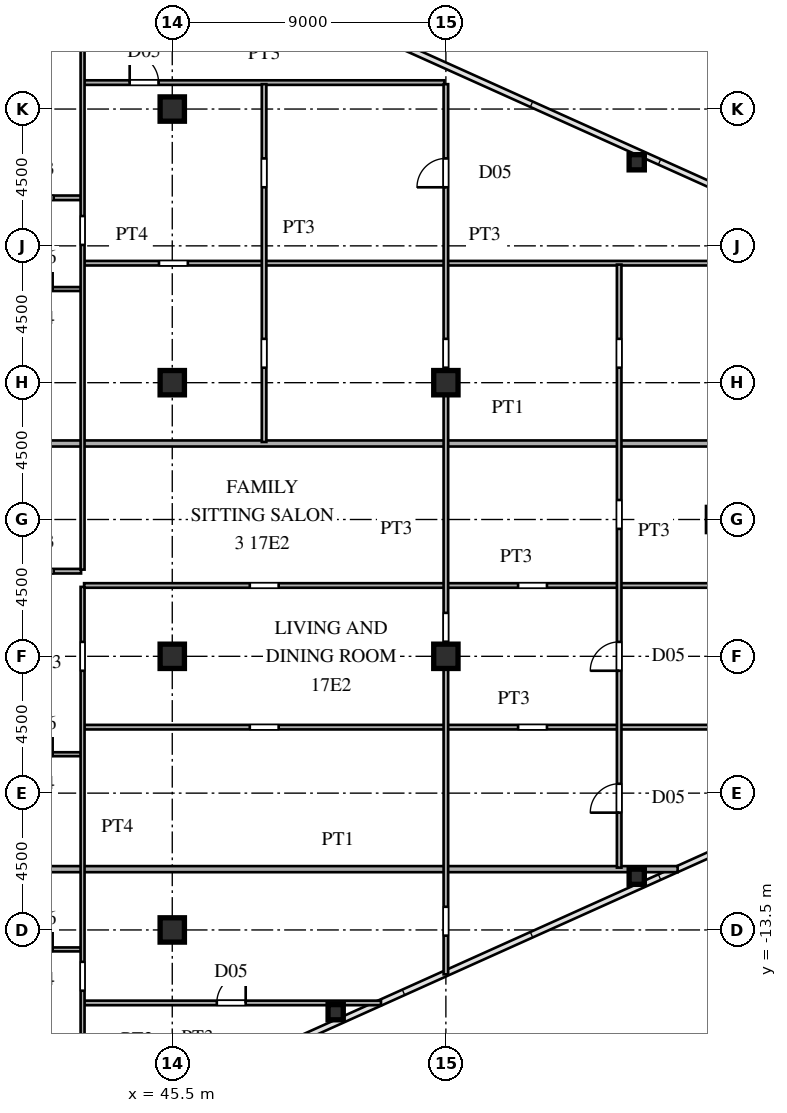
"""IFC4 building model, lengths in metres.
Left out: names, types, materials, properties, quantities, classifications, styles, units other than length and angle.
Written with IfcOpenShell. Run it as: python <this file> out.ifc"""

import sys

from ifc_helpers import new_model, si_unit, direction, frame, frame_2d, origin, origin_2d, place, context, subcontext, project, spatial, rectangle, hollow_rectangle, i_section, extrude, source, transform, mapped, element, fill, save


model = new_model("IFC4")
c1 = context("Model", 3, precision=1e-05, world=origin(), true_north=direction((0.0, 1.0)))
c2 = subcontext(c1, "Body", "Model", "MODEL_VIEW")
j1 = project(units=[si_unit("LENGTHUNIT", "METRE"), si_unit("PLANEANGLEUNIT", "RADIAN")], contexts=[c1])
p1 = place(None, origin())
s1 = spatial("IfcSite", under=j1, at=p1, CompositionType="ELEMENT")
p2 = place(p1, origin())
s2 = spatial("IfcBuilding", under=s1, at=p2, CompositionType="ELEMENT")
p3 = place(p2, frame((0.0, 0.0, 65.7)))
s3 = spatial("IfcBuildingStorey", under=s2, at=p3, CompositionType="ELEMENT", Elevation=65.7)
m1 = source(origin(), c2, "Body", "SweptSolid", [
    extrude(i_section(OverallWidth=0.8, OverallDepth=0.8, WebThickness=0.032, FlangeThickness=0.05, at=origin_2d()), origin(), (0.0, 0.0, 1.0), 3.6),
])
for number, where, z_axis, x_axis in (
    (1, (45.5, -13.5, 0.0), (0.0, 0.0, 1.0), (1.0, 0.0, 0.0)),
    (2, (45.5, -4.5, 0.0), (0.0, 0.0, 1.0), (1.0, 0.0, 0.0)),
    (3, (45.5, 4.5, 0.0), (0.0, 0.0, 1.0), (1.0, 0.0, 0.0)),
    (4, (45.5, 13.5, 0.0), (0.0, 0.0, 1.0), (1.0, 0.0, 0.0)),
    (5, (54.5, -4.5, 0.0), (0.0, 0.0, 1.0), (1.0, 0.0, 0.0)),
    (6, (54.5, 4.5, 0.0), (0.0, 0.0, 1.0), (1.0, 0.0, 0.0)),
    (7, (63.5, 0.0, 0.0), (0.0, 0.0, 1.0), (1.0, 0.0, 0.0)),
):
    element("IfcColumn", number, at=place(p3, frame(where, z_axis=z_axis, x_axis=x_axis)), inside=s3, PredefinedType="COLUMN", context=c2, shape_type="MappedRepresentation", body=[
        mapped(m1, transform((0.0, 0.0, 0.0), scale=1.0)),
    ])
m2 = source(origin(), c2, "Body", "SweptSolid", [
    extrude(hollow_rectangle(XDim=0.5, YDim=0.5, WallThickness=0.02, at=origin_2d()), origin(), (0.0, 0.0, 1.0), 3.6),
])
for number, where, z_axis, x_axis in (
    (8, (50.875, -16.205, 0.0), (0.0, 0.0, 1.0), (1.0, 0.0, 0.0)),
    (9, (60.778, -11.749, 0.0), (0.0, 0.0, 1.0), (1.0, 0.0, 0.0)),
    (10, (60.778, 11.749, 0.0), (0.0, 0.0, 1.0), (1.0, 0.0, 0.0)),
):
    element("IfcColumn", number, at=place(p3, frame(where, z_axis=z_axis, x_axis=x_axis)), inside=s3, PredefinedType="COLUMN", context=c2, shape_type="MappedRepresentation", body=[
        mapped(m2, transform((0.0, 0.0, 0.0), scale=1.0)),
    ])
p4 = place(p3, frame((42.6, -15.9, 0.0), z_axis=(0.0, 0.0, 1.0), x_axis=(1.0, 0.0, 0.0)))
e11 = element("IfcWall", 11, at=p4, inside=s3, PredefinedType="PARTITIONING", context=c2, shape_type="SweptSolid", body=[
    extrude(rectangle(XDim=9.765, YDim=0.15, at=frame_2d((4.882, 0.0))), origin(), (0.0, 0.0, 1.0), 3.38),
])
p5 = place(p4, frame((4.365, 0.0, 0.0)))
e12 = element("IfcOpeningElement", 12, at=p5, cuts=e11, PredefinedType="OPENING", context=c2, shape_type="SweptSolid", body=[
    extrude(rectangle(XDim=0.95, YDim=2.15, at=frame_2d((0.475, 1.075))), frame((0.0, 0.085, 0.0), z_axis=(0.0, -1.0, 0.0), x_axis=(1.0, 0.0, 0.0)), (0.0, 0.0, 1.0), 0.17),
])
p6 = place(p3, frame((39.75, -14.14, 0.0), z_axis=(0.0, 0.0, 1.0), x_axis=(1.0, 0.0, 0.0)))
e13 = element("IfcWall", 13, at=p6, inside=s3, PredefinedType="PARTITIONING", context=c2, shape_type="SweptSolid", body=[
    extrude(rectangle(XDim=2.75, YDim=0.13, at=frame_2d((1.375, 0.0))), origin(), (0.0, 0.0, 1.0), 3.38),
])
p7 = place(p6, frame((0.935, 0.0, 0.0)))
e14 = element("IfcOpeningElement", 14, at=p7, cuts=e13, PredefinedType="OPENING", context=c2, shape_type="SweptSolid", body=[
    extrude(rectangle(XDim=0.88, YDim=2.1, at=frame_2d((0.44, 1.05))), frame((0.0, 0.075, 0.0), z_axis=(0.0, -1.0, 0.0), x_axis=(1.0, 0.0, 0.0)), (0.0, 0.0, 1.0), 0.15),
])
p8 = place(p3, frame((39.78, -11.5, 0.0), z_axis=(0.0, 0.0, 1.0), x_axis=(1.0, 0.0, 0.0)))
e15 = element("IfcWall", 15, at=p8, inside=s3, PredefinedType="PARTITIONING", context=c2, shape_type="SweptSolid", body=[
    extrude(rectangle(XDim=22.343, YDim=0.2, at=frame_2d((11.171, 0.0))), origin(), (0.0, 0.0, 1.0), 3.38),
])
p9 = place(p3, frame((39.75, -7.72, 0.0), z_axis=(0.0, 0.0, 1.0), x_axis=(1.0, 0.0, 0.0)))
e16 = element("IfcWall", 16, at=p9, inside=s3, PredefinedType="PARTITIONING", context=c2, shape_type="SweptSolid", body=[
    extrude(rectangle(XDim=2.75, YDim=0.13, at=frame_2d((1.375, 0.0))), origin(), (0.0, 0.0, 1.0), 3.38),
])
p10 = place(p9, frame((0.935, 0.0, 0.0)))
e17 = element("IfcOpeningElement", 17, at=p10, cuts=e16, PredefinedType="OPENING", context=c2, shape_type="SweptSolid", body=[
    extrude(rectangle(XDim=0.88, YDim=2.1, at=frame_2d((0.44, 1.05))), frame((0.0, 0.075, 0.0), z_axis=(0.0, -1.0, 0.0), x_axis=(1.0, 0.0, 0.0)), (0.0, 0.0, 1.0), 0.15),
])
p11 = place(p3, frame((42.6, -6.83, 0.0), z_axis=(0.0, 0.0, 1.0), x_axis=(1.0, 0.0, 0.0)))
e18 = element("IfcWall", 18, at=p11, inside=s3, PredefinedType="PARTITIONING", context=c2, shape_type="SweptSolid", body=[
    extrude(rectangle(XDim=28.275, YDim=0.15, at=frame_2d((14.137, 0.0))), origin(), (0.0, 0.0, 1.0), 3.38),
])
p12 = place(p11, frame((5.45, 0.0, 0.0)))
e19 = element("IfcOpeningElement", 19, at=p12, cuts=e18, PredefinedType="OPENING", context=c2, shape_type="SweptSolid", body=[
    extrude(rectangle(XDim=0.95, YDim=2.15, at=frame_2d((0.475, 1.075))), frame((0.0, 0.085, 0.0), z_axis=(0.0, -1.0, 0.0), x_axis=(1.0, 0.0, 0.0)), (0.0, 0.0, 1.0), 0.17),
])
p13 = place(p11, frame((14.275, 0.0, 0.0)))
e20 = element("IfcOpeningElement", 20, at=p13, cuts=e18, PredefinedType="OPENING", context=c2, shape_type="SweptSolid", body=[
    extrude(rectangle(XDim=0.95, YDim=2.15, at=frame_2d((0.475, 1.075))), frame((0.0, 0.085, 0.0), z_axis=(0.0, -1.0, 0.0), x_axis=(1.0, 0.0, 0.0)), (0.0, 0.0, 1.0), 0.17),
])
p14 = place(p3, frame((42.6, -2.17, 0.0), z_axis=(0.0, 0.0, 1.0), x_axis=(1.0, 0.0, 0.0)))
e21 = element("IfcWall", 21, at=p14, inside=s3, PredefinedType="PARTITIONING", context=c2, shape_type="SweptSolid", body=[
    extrude(rectangle(XDim=28.435, YDim=0.15, at=frame_2d((14.217, 0.0))), origin(), (0.0, 0.0, 1.0), 3.38),
])
p15 = place(p14, frame((5.45, 0.0, 0.0)))
e22 = element("IfcOpeningElement", 22, at=p15, cuts=e21, PredefinedType="OPENING", context=c2, shape_type="SweptSolid", body=[
    extrude(rectangle(XDim=0.95, YDim=2.15, at=frame_2d((0.475, 1.075))), frame((0.0, 0.085, 0.0), z_axis=(0.0, -1.0, 0.0), x_axis=(1.0, 0.0, 0.0)), (0.0, 0.0, 1.0), 0.17),
])
p16 = place(p14, frame((14.275, 0.0, 0.0)))
e23 = element("IfcOpeningElement", 23, at=p16, cuts=e21, PredefinedType="OPENING", context=c2, shape_type="SweptSolid", body=[
    extrude(rectangle(XDim=0.95, YDim=2.15, at=frame_2d((0.475, 1.075))), frame((0.0, 0.085, 0.0), z_axis=(0.0, -1.0, 0.0), x_axis=(1.0, 0.0, 0.0)), (0.0, 0.0, 1.0), 0.17),
])
p17 = place(p3, frame((39.75, -1.7, 0.0), z_axis=(0.0, 0.0, 1.0), x_axis=(1.0, 0.0, 0.0)))
e24 = element("IfcWall", 24, at=p17, inside=s3, PredefinedType="PARTITIONING", context=c2, shape_type="SweptSolid", body=[
    extrude(rectangle(XDim=2.75, YDim=0.15, at=frame_2d((1.375, 0.0))), origin(), (0.0, 0.0, 1.0), 3.38),
])
p18 = place(p17, frame((0.9, 0.0, 0.0)))
e25 = element("IfcOpeningElement", 25, at=p18, cuts=e24, PredefinedType="OPENING", context=c2, shape_type="SweptSolid", body=[
    extrude(rectangle(XDim=0.95, YDim=2.15, at=frame_2d((0.475, 1.075))), frame((0.0, 0.085, 0.0), z_axis=(0.0, -1.0, 0.0), x_axis=(1.0, 0.0, 0.0)), (0.0, 0.0, 1.0), 0.17),
])
p19 = place(p3, frame((39.78, 2.5, 0.0), z_axis=(0.0, 0.0, 1.0), x_axis=(1.0, 0.0, 0.0)))
e26 = element("IfcWall", 26, at=p19, inside=s3, PredefinedType="PARTITIONING", context=c2, shape_type="SweptSolid", body=[
    extrude(rectangle(XDim=31.225, YDim=0.2, at=frame_2d((15.612, 0.0))), origin(), (0.0, 0.0, 1.0), 3.38),
])
p20 = place(p3, frame((39.75, 7.58, 0.0), z_axis=(0.0, 0.0, 1.0), x_axis=(1.0, 0.0, 0.0)))
e27 = element("IfcWall", 27, at=p20, inside=s3, PredefinedType="PARTITIONING", context=c2, shape_type="SweptSolid", body=[
    extrude(rectangle(XDim=2.75, YDim=0.13, at=frame_2d((1.375, 0.0))), origin(), (0.0, 0.0, 1.0), 3.38),
])
p21 = place(p20, frame((0.935, 0.0, 0.0)))
e28 = element("IfcOpeningElement", 28, at=p21, cuts=e27, PredefinedType="OPENING", context=c2, shape_type="SweptSolid", body=[
    extrude(rectangle(XDim=0.88, YDim=2.1, at=frame_2d((0.44, 1.05))), frame((0.0, 0.075, 0.0), z_axis=(0.0, -1.0, 0.0), x_axis=(1.0, 0.0, 0.0)), (0.0, 0.0, 1.0), 0.15),
])
p22 = place(p3, frame((42.6, 8.43, 0.0), z_axis=(0.0, 0.0, 1.0), x_axis=(1.0, 0.0, 0.0)))
e29 = element("IfcWall", 29, at=p22, inside=s3, PredefinedType="PARTITIONING", context=c2, shape_type="SweptSolid", body=[
    extrude(rectangle(XDim=26.359, YDim=0.15, at=frame_2d((13.179, 0.0))), origin(), (0.0, 0.0, 1.0), 3.38),
])
p23 = place(p22, frame((2.462, 0.0, 0.0)))
e30 = element("IfcOpeningElement", 30, at=p23, cuts=e29, PredefinedType="OPENING", context=c2, shape_type="SweptSolid", body=[
    extrude(rectangle(XDim=0.95, YDim=2.15, at=frame_2d((0.475, 1.075))), frame((0.0, 0.085, 0.0), z_axis=(0.0, -1.0, 0.0), x_axis=(1.0, 0.0, 0.0)), (0.0, 0.0, 1.0), 0.17),
])
p24 = place(p3, frame((39.75, 10.58, 0.0), z_axis=(0.0, 0.0, 1.0), x_axis=(1.0, 0.0, 0.0)))
e31 = element("IfcWall", 31, at=p24, inside=s3, PredefinedType="PARTITIONING", context=c2, shape_type="SweptSolid", body=[
    extrude(rectangle(XDim=2.75, YDim=0.15, at=frame_2d((1.375, 0.0))), origin(), (0.0, 0.0, 1.0), 3.38),
])
p25 = place(p24, frame((0.9, 0.0, 0.0)))
e32 = element("IfcOpeningElement", 32, at=p25, cuts=e31, PredefinedType="OPENING", context=c2, shape_type="SweptSolid", body=[
    extrude(rectangle(XDim=0.95, YDim=2.15, at=frame_2d((0.475, 1.075))), frame((0.0, 0.085, 0.0), z_axis=(0.0, -1.0, 0.0), x_axis=(1.0, 0.0, 0.0)), (0.0, 0.0, 1.0), 0.17),
])
p26 = place(p3, frame((42.6, 14.37, 0.0), z_axis=(0.0, 0.0, 1.0), x_axis=(1.0, 0.0, 0.0)))
e33 = element("IfcWall", 33, at=p26, inside=s3, PredefinedType="PARTITIONING", context=c2, shape_type="SweptSolid", body=[
    extrude(rectangle(XDim=11.85, YDim=0.15, at=frame_2d((5.925, 0.0))), origin(), (0.0, 0.0, 1.0), 3.38),
])
p27 = place(p26, frame((1.5, 0.0, 0.0)))
e34 = element("IfcOpeningElement", 34, at=p27, cuts=e33, PredefinedType="OPENING", context=c2, shape_type="SweptSolid", body=[
    extrude(rectangle(XDim=0.95, YDim=2.15, at=frame_2d((0.475, 1.075))), frame((0.0, 0.085, 0.0), z_axis=(0.0, -1.0, 0.0), x_axis=(1.0, 0.0, 0.0)), (0.0, 0.0, 1.0), 0.17),
])
p28 = place(p3, frame((42.55, -20.337, 0.0), z_axis=(0.0, 0.0, 1.0), x_axis=(0.0, 1.0, 0.0)))
e35 = element("IfcWall", 35, at=p28, inside=s3, PredefinedType="PARTITIONING", context=c2, shape_type="SweptSolid", body=[
    extrude(rectangle(XDim=18.12, YDim=0.13, at=frame_2d((9.06, 0.0))), origin(), (0.0, 0.0, 1.0), 3.38),
])
p29 = place(p28, frame((4.839, 0.0, 0.0)))
e36 = element("IfcOpeningElement", 36, at=p29, cuts=e35, PredefinedType="OPENING", context=c2, shape_type="SweptSolid", body=[
    extrude(rectangle(XDim=0.95, YDim=2.15, at=frame_2d((0.475, 1.075))), frame((0.0, 0.075, 0.0), z_axis=(0.0, -1.0, 0.0), x_axis=(1.0, 0.0, 0.0)), (0.0, 0.0, 1.0), 0.15),
])
p30 = place(p28, frame((15.362, 0.0, 0.0)))
e37 = element("IfcOpeningElement", 37, at=p30, cuts=e35, PredefinedType="OPENING", context=c2, shape_type="SweptSolid", body=[
    extrude(rectangle(XDim=0.95, YDim=2.15, at=frame_2d((0.475, 1.075))), frame((0.0, 0.075, 0.0), z_axis=(0.0, -1.0, 0.0), x_axis=(1.0, 0.0, 0.0)), (0.0, 0.0, 1.0), 0.15),
])
p31 = place(p3, frame((42.55, -1.648, 0.0), z_axis=(0.0, 0.0, 1.0), x_axis=(0.0, 1.0, 0.0)))
e38 = element("IfcWall", 38, at=p31, inside=s3, PredefinedType="PARTITIONING", context=c2, shape_type="SweptSolid", body=[
    extrude(rectangle(XDim=21.985, YDim=0.13, at=frame_2d((10.992, 0.0))), origin(), (0.0, 0.0, 1.0), 3.38),
])
p32 = place(p31, frame((10.679, 0.0, 0.0)))
e39 = element("IfcOpeningElement", 39, at=p32, cuts=e38, PredefinedType="OPENING", context=c2, shape_type="SweptSolid", body=[
    extrude(rectangle(XDim=0.95, YDim=2.15, at=frame_2d((0.475, 1.075))), frame((0.0, 0.075, 0.0), z_axis=(0.0, -1.0, 0.0), x_axis=(1.0, 0.0, 0.0)), (0.0, 0.0, 1.0), 0.15),
])
p33 = place(p3, frame((48.52, 2.55, 0.0), z_axis=(0.0, 0.0, 1.0), x_axis=(0.0, 1.0, 0.0)))
e40 = element("IfcWall", 40, at=p33, inside=s3, PredefinedType="PARTITIONING", context=c2, shape_type="SweptSolid", body=[
    extrude(rectangle(XDim=11.768, YDim=0.15, at=frame_2d((5.884, 0.0))), origin(), (0.0, 0.0, 1.0), 3.38),
])
p34 = place(p33, frame((8.376, 0.0, 0.0)))
e41 = element("IfcOpeningElement", 41, at=p34, cuts=e40, PredefinedType="OPENING", context=c2, shape_type="SweptSolid", body=[
    extrude(rectangle(XDim=0.95, YDim=2.15, at=frame_2d((0.475, 1.075))), frame((0.0, 0.085, 0.0), z_axis=(0.0, -1.0, 0.0), x_axis=(1.0, 0.0, 0.0)), (0.0, 0.0, 1.0), 0.17),
])
p35 = place(p33, frame((2.442, 0.0, 0.0)))
e42 = element("IfcOpeningElement", 42, at=p35, cuts=e40, PredefinedType="OPENING", context=c2, shape_type="SweptSolid", body=[
    extrude(rectangle(XDim=0.95, YDim=2.15, at=frame_2d((0.475, 1.075))), frame((0.0, 0.085, 0.0), z_axis=(0.0, -1.0, 0.0), x_axis=(1.0, 0.0, 0.0)), (0.0, 0.0, 1.0), 0.17),
])
p36 = place(p3, frame((54.5, -14.96, 0.0), z_axis=(0.0, 0.0, 1.0), x_axis=(0.0, 1.0, 0.0)))
e43 = element("IfcWall", 43, at=p36, inside=s3, PredefinedType="PARTITIONING", context=c2, shape_type="SweptSolid", body=[
    extrude(rectangle(XDim=29.278, YDim=0.15, at=frame_2d((14.639, 0.0))), origin(), (0.0, 0.0, 1.0), 2.68),
])
p37 = place(p36, frame((1.272, 0.0, 0.0)))
e44 = element("IfcOpeningElement", 44, at=p37, cuts=e43, PredefinedType="OPENING", context=c2, shape_type="SweptSolid", body=[
    extrude(rectangle(XDim=0.95, YDim=2.15, at=frame_2d((0.475, 1.075))), frame((0.0, 0.085, 0.0), z_axis=(0.0, -1.0, 0.0), x_axis=(1.0, 0.0, 0.0)), (0.0, 0.0, 1.0), 0.17),
])
p38 = place(p36, frame((10.94, 0.0, 0.0)))
e45 = element("IfcOpeningElement", 45, at=p38, cuts=e43, PredefinedType="OPENING", context=c2, shape_type="SweptSolid", body=[
    extrude(rectangle(XDim=0.95, YDim=2.15, at=frame_2d((0.475, 1.075))), frame((0.0, 0.085, 0.0), z_axis=(0.0, -1.0, 0.0), x_axis=(1.0, 0.0, 0.0)), (0.0, 0.0, 1.0), 0.17),
])
p39 = place(p36, frame((25.886, 0.0, 0.0)))
e46 = element("IfcOpeningElement", 46, at=p39, cuts=e43, PredefinedType="OPENING", context=c2, shape_type="SweptSolid", body=[
    extrude(rectangle(XDim=0.95, YDim=2.15, at=frame_2d((0.475, 1.075))), frame((0.0, 0.085, 0.0), z_axis=(0.0, -1.0, 0.0), x_axis=(1.0, 0.0, 0.0)), (0.0, 0.0, 1.0), 0.17),
])
p40 = place(p36, frame((19.952, 0.0, 0.0)))
e47 = element("IfcOpeningElement", 47, at=p40, cuts=e43, PredefinedType="OPENING", context=c2, shape_type="SweptSolid", body=[
    extrude(rectangle(XDim=0.95, YDim=2.15, at=frame_2d((0.475, 1.075))), frame((0.0, 0.085, 0.0), z_axis=(0.0, -1.0, 0.0), x_axis=(1.0, 0.0, 0.0)), (0.0, 0.0, 1.0), 0.17),
])
p41 = place(p3, frame((60.2, -11.45, 0.0), z_axis=(0.0, 0.0, 1.0), x_axis=(0.0, 1.0, 0.0)))
e48 = element("IfcWall", 48, at=p41, inside=s3, PredefinedType="PARTITIONING", context=c2, shape_type="SweptSolid", body=[
    extrude(rectangle(XDim=19.834, YDim=0.15, at=frame_2d((9.917, 0.0))), origin(), (0.0, 0.0, 1.0), 3.38),
])
p42 = place(p41, frame((1.808, 0.0, 0.0)))
e49 = element("IfcOpeningElement", 49, at=p42, cuts=e48, PredefinedType="OPENING", context=c2, shape_type="SweptSolid", body=[
    extrude(rectangle(XDim=0.95, YDim=2.15, at=frame_2d((0.475, 1.075))), frame((0.0, 0.085, 0.0), z_axis=(0.0, -1.0, 0.0), x_axis=(1.0, 0.0, 0.0)), (0.0, 0.0, 1.0), 0.17),
])
p43 = place(p41, frame((6.475, 0.0, 0.0)))
e50 = element("IfcOpeningElement", 50, at=p43, cuts=e48, PredefinedType="OPENING", context=c2, shape_type="SweptSolid", body=[
    extrude(rectangle(XDim=0.95, YDim=2.15, at=frame_2d((0.475, 1.075))), frame((0.0, 0.085, 0.0), z_axis=(0.0, -1.0, 0.0), x_axis=(1.0, 0.0, 0.0)), (0.0, 0.0, 1.0), 0.17),
])
p44 = place(p41, frame((11.142, 0.0, 0.0)))
e51 = element("IfcOpeningElement", 51, at=p44, cuts=e48, PredefinedType="OPENING", context=c2, shape_type="SweptSolid", body=[
    extrude(rectangle(XDim=0.95, YDim=2.15, at=frame_2d((0.475, 1.075))), frame((0.0, 0.085, 0.0), z_axis=(0.0, -1.0, 0.0), x_axis=(1.0, 0.0, 0.0)), (0.0, 0.0, 1.0), 0.17),
])
p45 = place(p41, frame((16.442, 0.0, 0.0)))
e52 = element("IfcOpeningElement", 52, at=p45, cuts=e48, PredefinedType="OPENING", context=c2, shape_type="SweptSolid", body=[
    extrude(rectangle(XDim=0.95, YDim=2.15, at=frame_2d((0.475, 1.075))), frame((0.0, 0.085, 0.0), z_axis=(0.0, -1.0, 0.0), x_axis=(1.0, 0.0, 0.0)), (0.0, 0.0, 1.0), 0.17),
])
m3 = source(origin(), c2, "Body", "SweptSolid", [
    extrude(rectangle(XDim=0.95, YDim=2.15, at=frame_2d((0.475, 1.075))), frame((0.0, 0.025, 0.0), z_axis=(0.0, -1.0, 0.0), x_axis=(1.0, 0.0, 0.0)), (0.0, 0.0, 1.0), 0.05),
])
p46 = place(p5, origin())
e53 = element("IfcDoor", 53, at=p46, inside=s3, OperationType="SINGLE_SWING_RIGHT", PredefinedType="DOOR", context=c2, shape_type="MappedRepresentation", body=[
    mapped(m3, transform((0.0, 0.0, 0.0), scale=1.0)),
])
fill(e12, e53)
m4 = source(origin(), c2, "Body", "SweptSolid", [
    extrude(rectangle(XDim=0.88, YDim=2.1, at=frame_2d((0.44, 1.05))), frame((0.0, 0.025, 0.0), z_axis=(0.0, -1.0, 0.0), x_axis=(1.0, 0.0, 0.0)), (0.0, 0.0, 1.0), 0.05),
])
p47 = place(p7, origin())
e54 = element("IfcDoor", 54, at=p47, inside=s3, OperationType="SINGLE_SWING_RIGHT", PredefinedType="DOOR", context=c2, shape_type="MappedRepresentation", body=[
    mapped(m4, transform((0.0, 0.0, 0.0), scale=1.0)),
])
fill(e14, e54)
p48 = place(p10, origin())
e55 = element("IfcDoor", 55, at=p48, inside=s3, OperationType="SINGLE_SWING_RIGHT", PredefinedType="DOOR", context=c2, shape_type="MappedRepresentation", body=[
    mapped(m4, transform((0.0, 0.0, 0.0), scale=1.0)),
])
fill(e17, e55)
p49 = place(p21, origin())
e56 = element("IfcDoor", 56, at=p49, inside=s3, OperationType="SINGLE_SWING_RIGHT", PredefinedType="DOOR", context=c2, shape_type="MappedRepresentation", body=[
    mapped(m4, transform((0.0, 0.0, 0.0), scale=1.0)),
])
fill(e28, e56)
p50 = place(p27, origin())
e57 = element("IfcDoor", 57, at=p50, inside=s3, OperationType="SINGLE_SWING_LEFT", PredefinedType="DOOR", context=c2, shape_type="MappedRepresentation", body=[
    mapped(m3, transform((0.0, 0.0, 0.0), scale=1.0)),
])
fill(e34, e57)
p51 = place(p39, origin())
e58 = element("IfcDoor", 58, at=p51, inside=s3, OperationType="SINGLE_SWING_LEFT", PredefinedType="DOOR", context=c2, shape_type="MappedRepresentation", body=[
    mapped(m3, transform((0.0, 0.0, 0.0), scale=1.0)),
])
fill(e46, e58)
p52 = place(p42, origin())
e59 = element("IfcDoor", 59, at=p52, inside=s3, OperationType="SINGLE_SWING_LEFT", PredefinedType="DOOR", context=c2, shape_type="MappedRepresentation", body=[
    mapped(m3, transform((0.0, 0.0, 0.0), scale=1.0)),
])
fill(e49, e59)
p53 = place(p43, origin())
e60 = element("IfcDoor", 60, at=p53, inside=s3, OperationType="SINGLE_SWING_LEFT", PredefinedType="DOOR", context=c2, shape_type="MappedRepresentation", body=[
    mapped(m3, transform((0.0, 0.0, 0.0), scale=1.0)),
])
fill(e50, e60)
save(model, sys.argv[1])
